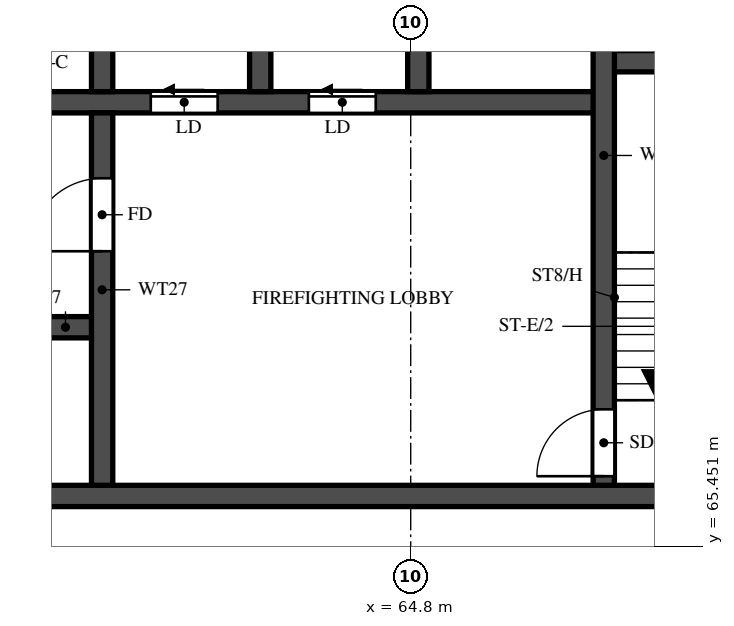
"""IFC4 building model, lengths in metres.
Left out: names, types, materials, properties, quantities, classifications, styles, units other than length and angle.
Written with IfcOpenShell. Run it as: python <this file> out.ifc"""

import sys

from ifc_helpers import new_model, si_unit, direction, frame, frame_2d, origin, place, context, subcontext, project, spatial, rectangle, extrude, element, fill, save


model = new_model("IFC4")
c1 = context("Model", 3, precision=1e-05, world=origin(), true_north=direction((0.0, 1.0)))
c2 = subcontext(c1, "Body", "Model", "MODEL_VIEW")
j1 = project(units=[si_unit("LENGTHUNIT", "METRE"), si_unit("PLANEANGLEUNIT", "RADIAN")], contexts=[c1])
p1 = place(None, origin())
s1 = spatial("IfcSite", under=j1, at=p1, CompositionType="ELEMENT")
p2 = place(p1, origin())
s2 = spatial("IfcBuilding", under=s1, at=p2, CompositionType="ELEMENT")
p3 = place(p2, frame((0.0, 0.0, 150.0)))
s3 = spatial("IfcBuildingStorey", under=s2, at=p3, CompositionType="ELEMENT", Elevation=150.0)
p4 = place(p3, frame((29.7, 66.275, 0.0), z_axis=(0.0, 0.0, 1.0), x_axis=(1.0, 0.0, 0.0)))
e1 = element("IfcWall", 1, at=p4, inside=s3, PredefinedType="SHEAR", context=c2, shape_type="SweptSolid", body=[
    extrude(rectangle(XDim=41.4, YDim=0.35, at=frame_2d((20.7, 0.0))), origin(), (0.0, 0.0, 1.0), 3.2),
])
p5 = place(p4, frame((0.925, 0.0, 0.0)))
e2 = element("IfcOpeningElement", 2, at=p5, cuts=e1, PredefinedType="OPENING", context=c2, shape_type="SweptSolid", body=[
    extrude(rectangle(XDim=1.1, YDim=2.1, at=frame_2d((0.55, 1.05))), frame((0.0, 0.185, 0.0), z_axis=(0.0, -1.0, 0.0), x_axis=(1.0, 0.0, 0.0)), (0.0, 0.0, 1.0), 0.37),
])
p6 = place(p4, frame((3.712, 0.0, 0.0)))
e3 = element("IfcOpeningElement", 3, at=p6, cuts=e1, PredefinedType="OPENING", context=c2, shape_type="SweptSolid", body=[
    extrude(rectangle(XDim=1.8, YDim=2.1, at=frame_2d((0.9, 1.05))), frame((0.0, 0.185, 0.0), z_axis=(0.0, -1.0, 0.0), x_axis=(1.0, 0.0, 0.0)), (0.0, 0.0, 1.0), 0.37),
])
p7 = place(p3, frame((35.625, 69.05, 0.0), z_axis=(0.0, 0.0, 1.0), x_axis=(1.0, 0.0, 0.0)))
e4 = element("IfcWall", 4, at=p7, inside=s3, PredefinedType="SHEAR", context=c2, shape_type="SweptSolid", body=[
    extrude(rectangle(XDim=24.1, YDim=0.35, at=frame_2d((12.05, 0.0))), origin(), (0.0, 0.0, 1.0), 3.2),
])
p8 = place(p7, frame((1.0, 0.0, 0.0)))
e5 = element("IfcOpeningElement", 5, at=p8, cuts=e4, PredefinedType="OPENING", context=c2, shape_type="SweptSolid", body=[
    extrude(rectangle(XDim=1.1, YDim=2.1, at=frame_2d((0.55, 1.05))), frame((0.0, 0.185, 0.0), z_axis=(0.0, -1.0, 0.0), x_axis=(1.0, 0.0, 0.0)), (0.0, 0.0, 1.0), 0.37),
])
p9 = place(p7, frame((3.75, 0.0, 0.0)))
e6 = element("IfcOpeningElement", 6, at=p9, cuts=e4, PredefinedType="OPENING", context=c2, shape_type="SweptSolid", body=[
    extrude(rectangle(XDim=1.1, YDim=2.1, at=frame_2d((0.55, 1.05))), frame((0.0, 0.185, 0.0), z_axis=(0.0, -1.0, 0.0), x_axis=(1.0, 0.0, 0.0)), (0.0, 0.0, 1.0), 0.37),
])
p10 = place(p7, frame((6.5, 0.0, 0.0)))
e7 = element("IfcOpeningElement", 7, at=p10, cuts=e4, PredefinedType="OPENING", context=c2, shape_type="SweptSolid", body=[
    extrude(rectangle(XDim=1.1, YDim=2.1, at=frame_2d((0.55, 1.05))), frame((0.0, 0.185, 0.0), z_axis=(0.0, -1.0, 0.0), x_axis=(1.0, 0.0, 0.0)), (0.0, 0.0, 1.0), 0.37),
])
p11 = place(p7, frame((9.25, 0.0, 0.0)))
e8 = element("IfcOpeningElement", 8, at=p11, cuts=e4, PredefinedType="OPENING", context=c2, shape_type="SweptSolid", body=[
    extrude(rectangle(XDim=1.1, YDim=2.1, at=frame_2d((0.55, 1.05))), frame((0.0, 0.185, 0.0), z_axis=(0.0, -1.0, 0.0), x_axis=(1.0, 0.0, 0.0)), (0.0, 0.0, 1.0), 0.37),
])
p12 = place(p7, frame((12.0, 0.0, 0.0)))
e9 = element("IfcOpeningElement", 9, at=p12, cuts=e4, PredefinedType="OPENING", context=c2, shape_type="SweptSolid", body=[
    extrude(rectangle(XDim=1.1, YDim=2.1, at=frame_2d((0.55, 1.05))), frame((0.0, 0.185, 0.0), z_axis=(0.0, -1.0, 0.0), x_axis=(1.0, 0.0, 0.0)), (0.0, 0.0, 1.0), 0.37),
])
p13 = place(p7, frame((14.75, 0.0, 0.0)))
e10 = element("IfcOpeningElement", 10, at=p13, cuts=e4, PredefinedType="OPENING", context=c2, shape_type="SweptSolid", body=[
    extrude(rectangle(XDim=1.1, YDim=2.1, at=frame_2d((0.55, 1.05))), frame((0.0, 0.185, 0.0), z_axis=(0.0, -1.0, 0.0), x_axis=(1.0, 0.0, 0.0)), (0.0, 0.0, 1.0), 0.37),
])
p14 = place(p7, frame((17.625, 0.0, 0.0)))
e11 = element("IfcOpeningElement", 11, at=p14, cuts=e4, PredefinedType="OPENING", context=c2, shape_type="SweptSolid", body=[
    extrude(rectangle(XDim=1.1, YDim=2.1, at=frame_2d((0.55, 1.05))), frame((0.0, 0.185, 0.0), z_axis=(0.0, -1.0, 0.0), x_axis=(1.0, 0.0, 0.0)), (0.0, 0.0, 1.0), 0.37),
])
p15 = place(p7, frame((20.625, 0.0, 0.0)))
e12 = element("IfcOpeningElement", 12, at=p15, cuts=e4, PredefinedType="OPENING", context=c2, shape_type="SweptSolid", body=[
    extrude(rectangle(XDim=1.1, YDim=2.1, at=frame_2d((0.55, 1.05))), frame((0.0, 0.185, 0.0), z_axis=(0.0, -1.0, 0.0), x_axis=(1.0, 0.0, 0.0)), (0.0, 0.0, 1.0), 0.37),
])
p16 = place(p3, frame((32.825, 72.75, 0.0), z_axis=(0.0, 0.0, 1.0), x_axis=(1.0, 0.0, 0.0)))
e13 = element("IfcWall", 13, at=p16, inside=s3, PredefinedType="SHEAR", context=c2, shape_type="SweptSolid", body=[
    extrude(rectangle(XDim=35.15, YDim=0.35, at=frame_2d((17.575, 0.0))), origin(), (0.0, 0.0, 1.0), 3.2),
])
p17 = place(p16, frame((19.8, 0.0, 0.0)))
e14 = element("IfcOpeningElement", 14, at=p17, cuts=e13, PredefinedType="OPENING", context=c2, shape_type="SweptSolid", body=[
    extrude(rectangle(XDim=1.1, YDim=2.1, at=frame_2d((0.55, 1.05))), frame((0.0, 0.185, 0.0), z_axis=(0.0, -1.0, 0.0), x_axis=(1.0, 0.0, 0.0)), (0.0, 0.0, 1.0), 0.37),
])
p18 = place(p16, frame((27.7, 0.0, 0.0)))
e15 = element("IfcOpeningElement", 15, at=p18, cuts=e13, PredefinedType="OPENING", context=c2, shape_type="SweptSolid", body=[
    extrude(rectangle(XDim=1.1, YDim=2.1, at=frame_2d((0.55, 1.05))), frame((0.0, 0.185, 0.0), z_axis=(0.0, -1.0, 0.0), x_axis=(1.0, 0.0, 0.0)), (0.0, 0.0, 1.0), 0.37),
])
p19 = place(p16, frame((30.3, 0.0, 0.0)))
e16 = element("IfcOpeningElement", 16, at=p19, cuts=e13, PredefinedType="OPENING", context=c2, shape_type="SweptSolid", body=[
    extrude(rectangle(XDim=1.1, YDim=2.1, at=frame_2d((0.55, 1.05))), frame((0.0, 0.185, 0.0), z_axis=(0.0, -1.0, 0.0), x_axis=(1.0, 0.0, 0.0)), (0.0, 0.0, 1.0), 0.37),
])
p20 = place(p16, frame((3.8, 0.0, 0.0)))
e17 = element("IfcOpeningElement", 17, at=p20, cuts=e13, PredefinedType="OPENING", context=c2, shape_type="SweptSolid", body=[
    extrude(rectangle(XDim=1.1, YDim=2.1, at=frame_2d((0.55, 1.05))), frame((0.0, 0.185, 0.0), z_axis=(0.0, -1.0, 0.0), x_axis=(1.0, 0.0, 0.0)), (0.0, 0.0, 1.0), 0.37),
])
p21 = place(p16, frame((6.55, 0.0, 0.0)))
e18 = element("IfcOpeningElement", 18, at=p21, cuts=e13, PredefinedType="OPENING", context=c2, shape_type="SweptSolid", body=[
    extrude(rectangle(XDim=1.1, YDim=2.1, at=frame_2d((0.55, 1.05))), frame((0.0, 0.185, 0.0), z_axis=(0.0, -1.0, 0.0), x_axis=(1.0, 0.0, 0.0)), (0.0, 0.0, 1.0), 0.37),
])
p22 = place(p16, frame((9.3, 0.0, 0.0)))
e19 = element("IfcOpeningElement", 19, at=p22, cuts=e13, PredefinedType="OPENING", context=c2, shape_type="SweptSolid", body=[
    extrude(rectangle(XDim=1.1, YDim=2.1, at=frame_2d((0.55, 1.05))), frame((0.0, 0.185, 0.0), z_axis=(0.0, -1.0, 0.0), x_axis=(1.0, 0.0, 0.0)), (0.0, 0.0, 1.0), 0.37),
])
p23 = place(p16, frame((12.05, 0.0, 0.0)))
e20 = element("IfcOpeningElement", 20, at=p23, cuts=e13, PredefinedType="OPENING", context=c2, shape_type="SweptSolid", body=[
    extrude(rectangle(XDim=1.1, YDim=2.1, at=frame_2d((0.55, 1.05))), frame((0.0, 0.185, 0.0), z_axis=(0.0, -1.0, 0.0), x_axis=(1.0, 0.0, 0.0)), (0.0, 0.0, 1.0), 0.37),
])
p24 = place(p16, frame((14.8, 0.0, 0.0)))
e21 = element("IfcOpeningElement", 21, at=p24, cuts=e13, PredefinedType="OPENING", context=c2, shape_type="SweptSolid", body=[
    extrude(rectangle(XDim=1.1, YDim=2.1, at=frame_2d((0.55, 1.05))), frame((0.0, 0.185, 0.0), z_axis=(0.0, -1.0, 0.0), x_axis=(1.0, 0.0, 0.0)), (0.0, 0.0, 1.0), 0.37),
])
p25 = place(p16, frame((17.55, 0.0, 0.0)))
e22 = element("IfcOpeningElement", 22, at=p25, cuts=e13, PredefinedType="OPENING", context=c2, shape_type="SweptSolid", body=[
    extrude(rectangle(XDim=1.1, YDim=2.1, at=frame_2d((0.55, 1.05))), frame((0.0, 0.185, 0.0), z_axis=(0.0, -1.0, 0.0), x_axis=(1.0, 0.0, 0.0)), (0.0, 0.0, 1.0), 0.37),
])
p26 = place(p16, frame((0.938, 0.0, 0.0)))
e23 = element("IfcOpeningElement", 23, at=p26, cuts=e13, PredefinedType="OPENING", context=c2, shape_type="SweptSolid", body=[
    extrude(rectangle(XDim=1.1, YDim=2.1, at=frame_2d((0.55, 1.05))), frame((0.0, 0.185, 0.0), z_axis=(0.0, -1.0, 0.0), x_axis=(1.0, 0.0, 0.0)), (0.0, 0.0, 1.0), 0.37),
])
p27 = place(p3, frame((67.975, 73.425, 0.0), z_axis=(0.0, 0.0, 1.0), x_axis=(1.0, 0.0, 0.0)))
e24 = element("IfcWall", 24, at=p27, inside=s3, PredefinedType="SHEAR", context=c2, shape_type="SweptSolid", body=[
    extrude(rectangle(XDim=3.125, YDim=0.35, at=frame_2d((1.562, 0.0))), origin(), (0.0, 0.0, 1.0), 3.2),
])
p28 = place(p3, frame((67.975, 66.45, 0.0), z_axis=(0.0, 0.0, 1.0), x_axis=(0.0, 1.0, 0.0)))
e25 = element("IfcWall", 25, at=p28, inside=s3, PredefinedType="SHEAR", context=c2, shape_type="SweptSolid", body=[
    extrude(rectangle(XDim=10.85, YDim=0.35, at=frame_2d((5.425, 0.0))), origin(), (0.0, 0.0, 1.0), 3.2),
])
p29 = place(p28, frame((0.15, 0.0, 0.0)))
e26 = element("IfcOpeningElement", 26, at=p29, cuts=e25, PredefinedType="OPENING", context=c2, shape_type="SweptSolid", body=[
    extrude(rectangle(XDim=1.1, YDim=2.1, at=frame_2d((0.55, 1.05))), frame((0.0, 0.185, 0.0), z_axis=(0.0, -1.0, 0.0), x_axis=(1.0, 0.0, 0.0)), (0.0, 0.0, 1.0), 0.37),
])
p30 = place(p3, frame((59.725, 66.45, 0.0), z_axis=(0.0, 0.0, 1.0), x_axis=(0.0, 1.0, 0.0)))
e27 = element("IfcWall", 27, at=p30, inside=s3, PredefinedType="SHEAR", context=c2, shape_type="SweptSolid", body=[
    extrude(rectangle(XDim=6.125, YDim=0.35, at=frame_2d((3.062, 0.0))), origin(), (0.0, 0.0, 1.0), 3.2),
])
p31 = place(p30, frame((3.85, 0.0, 0.0)))
e28 = element("IfcOpeningElement", 28, at=p31, cuts=e27, PredefinedType="OPENING", context=c2, shape_type="SweptSolid", body=[
    extrude(rectangle(XDim=1.2, YDim=2.1, at=frame_2d((0.6, 1.05))), frame((0.0, 0.185, 0.0), z_axis=(0.0, -1.0, 0.0), x_axis=(1.0, 0.0, 0.0)), (0.0, 0.0, 1.0), 0.37),
])
for number, where, z_axis, x_axis in (
    (29, (59.725, 72.925, 0.0), (0.0, 0.0, 1.0), (0.0, 1.0, 0.0)),
    (30, (62.325, 72.925, 0.0), (0.0, 0.0, 1.0), (0.0, 1.0, 0.0)),
    (31, (64.925, 72.925, 0.0), (0.0, 0.0, 1.0), (0.0, 1.0, 0.0)),
):
    element("IfcWall", number, at=place(p3, frame(where, z_axis=z_axis, x_axis=x_axis)), inside=s3, PredefinedType="SHEAR", context=c2, shape_type="SweptSolid", body=[
        extrude(rectangle(XDim=2.95, YDim=0.35, at=frame_2d((1.475, 0.0))), origin(), (0.0, 0.0, 1.0), 3.2),
    ])
p32 = place(p29, origin())
e32 = element("IfcDoor", 32, at=p32, inside=s3, OperationType="SINGLE_SWING_LEFT", PredefinedType="DOOR", context=c2, shape_type="SweptSolid", body=[
    extrude(rectangle(XDim=1.1, YDim=2.1, at=frame_2d((0.55, 1.05))), frame((0.0, 0.025, 0.0), z_axis=(0.0, -1.0, 0.0), x_axis=(1.0, 0.0, 0.0)), (0.0, 0.0, 1.0), 0.05),
])
fill(e26, e32)
p33 = place(p31, origin())
e33 = element("IfcDoor", 33, at=p33, inside=s3, OperationType="SINGLE_SWING_LEFT", PredefinedType="DOOR", context=c2, shape_type="SweptSolid", body=[
    extrude(rectangle(XDim=1.2, YDim=2.1, at=frame_2d((0.6, 1.05))), frame((0.0, 0.025, 0.0), z_axis=(0.0, -1.0, 0.0), x_axis=(1.0, 0.0, 0.0)), (0.0, 0.0, 1.0), 0.05),
])
fill(e28, e33)
p34 = place(p18, origin())
e34 = element("IfcDoor", 34, at=p34, inside=s3, OperationType="SLIDING_TO_LEFT", PredefinedType="DOOR", context=c2, shape_type="SweptSolid", body=[
    extrude(rectangle(XDim=1.1, YDim=2.1, at=frame_2d((0.55, 1.05))), frame((0.0, 0.025, 0.0), z_axis=(0.0, -1.0, 0.0), x_axis=(1.0, 0.0, 0.0)), (0.0, 0.0, 1.0), 0.05),
])
fill(e15, e34)
p35 = place(p19, origin())
e35 = element("IfcDoor", 35, at=p35, inside=s3, OperationType="SLIDING_TO_LEFT", PredefinedType="DOOR", context=c2, shape_type="SweptSolid", body=[
    extrude(rectangle(XDim=1.1, YDim=2.1, at=frame_2d((0.55, 1.05))), frame((0.0, 0.025, 0.0), z_axis=(0.0, -1.0, 0.0), x_axis=(1.0, 0.0, 0.0)), (0.0, 0.0, 1.0), 0.05),
])
fill(e16, e35)
save(model, sys.argv[1])
